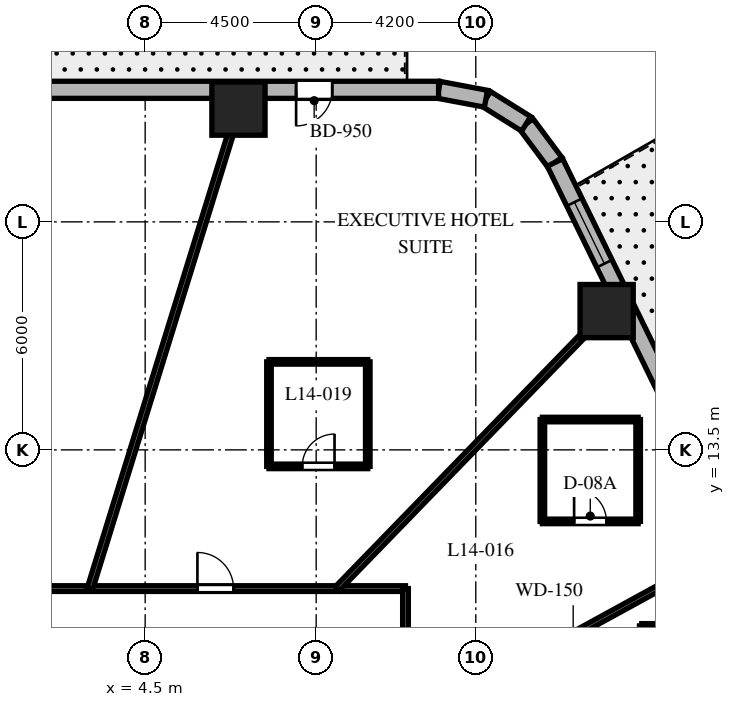
"""IFC4 building model, lengths in metres.
Left out: names, types, materials, properties, quantities, classifications, styles, units other than length and angle.
Written with IfcOpenShell. Run it as: python <this file> out.ifc"""

import sys

from ifc_helpers import new_model, si_unit, direction, frame, frame_2d, origin, origin_2d, place, context, subcontext, project, spatial, rectangle, extrude, element, fill, save


model = new_model("IFC4")
c1 = context("Model", 3, precision=1e-05, world=origin(), true_north=direction((0.0, 1.0)))
c2 = subcontext(c1, "Body", "Model", "MODEL_VIEW")
j1 = project(units=[si_unit("LENGTHUNIT", "METRE"), si_unit("PLANEANGLEUNIT", "RADIAN")], contexts=[c1])
p1 = place(None, origin())
s1 = spatial("IfcSite", under=j1, at=p1, CompositionType="ELEMENT")
p2 = place(p1, origin())
s2 = spatial("IfcBuilding", under=s1, at=p2, CompositionType="ELEMENT")
p3 = place(p2, frame((0.0, 0.0, 63.8)))
s3 = spatial("IfcBuildingStorey", under=s2, at=p3, CompositionType="ELEMENT", Elevation=63.8)
for number, where, z_axis, x_axis in (
    (1, (16.643, 17.152, 0.0), (0.0, 0.0, 1.0), (1.0, 0.0, 0.0)),
    (2, (6.955, 22.48, 0.0), (0.0, 0.0, 1.0), (1.0, 0.0, 0.0)),
):
    element("IfcColumn", number, at=place(p3, frame(where, z_axis=z_axis, x_axis=x_axis)), inside=s3, PredefinedType="COLUMN", context=c2, shape_type="SweptSolid", body=[
        extrude(rectangle(XDim=1.4, YDim=1.4, at=origin_2d()), origin(), (0.0, 0.0, 1.0), 3.7),
    ])
p4 = place(p3, frame((15.284, 21.062, 0.0), z_axis=(0.0, 0.0, 1.0), x_axis=(-0.597595366449, 0.801797841104, 0.0)))
e3 = element("IfcWall", 3, at=p4, inside=s3, PredefinedType="SOLIDWALL", context=c2, shape_type="SweptSolid", body=[
    extrude(rectangle(XDim=1.269, YDim=0.45, at=frame_2d((0.634, 0.0))), origin(), (0.0, 0.0, 1.0), 3.4),
])
p5 = place(p3, frame((14.526, 22.08, 0.0), z_axis=(0.0, 0.0, 1.0), x_axis=(-0.848185203596, 0.529699783275, 0.0)))
e4 = element("IfcWall", 4, at=p5, inside=s3, PredefinedType="SOLIDWALL", context=c2, shape_type="SweptSolid", body=[
    extrude(rectangle(XDim=1.247, YDim=0.45, at=frame_2d((0.624, 0.0))), origin(), (0.0, 0.0, 1.0), 3.4),
])
p6 = place(p3, frame((13.468, 22.74, 0.0), z_axis=(0.0, 0.0, 1.0), x_axis=(-0.982717174228, 0.185113358451, 0.0)))
e5 = element("IfcWall", 5, at=p6, inside=s3, PredefinedType="SOLIDWALL", context=c2, shape_type="SweptSolid", body=[
    extrude(rectangle(XDim=1.269, YDim=0.45, at=frame_2d((0.634, 0.0))), origin(), (0.0, 0.0, 1.0), 3.4),
])
p7 = place(p3, frame((24.336, 2.532, 0.0), z_axis=(0.0, 0.0, 1.0), x_axis=(-0.438931326393, 0.898520612291, 0.0)))
e6 = element("IfcWall", 6, at=p7, inside=s3, PredefinedType="SOLIDWALL", context=c2, shape_type="SweptSolid", body=[
    extrude(rectangle(XDim=20.623, YDim=0.45, at=frame_2d((10.312, 0.0))), origin(), (0.0, 0.0, 1.0), 3.4),
])
p8 = place(p7, frame((5.171, 0.0, 0.0)))
e7 = element("IfcOpeningElement", 7, at=p8, cuts=e6, PredefinedType="OPENING", context=c2, shape_type="SweptSolid", body=[
    extrude(rectangle(XDim=1.0, YDim=2.15, at=frame_2d((0.5, 1.075))), frame((0.0, 0.235, 0.0), z_axis=(0.0, -1.0, 0.0), x_axis=(1.0, 0.0, 0.0)), (0.0, 0.0, 1.0), 0.47),
])
p9 = place(p7, frame((6.8, 0.0, 0.8)))
e8 = element("IfcOpeningElement", 8, at=p9, cuts=e6, PredefinedType="OPENING", context=c2, shape_type="SweptSolid", body=[
    extrude(rectangle(XDim=1.8, YDim=1.8, at=frame_2d((0.9, 0.9))), frame((0.0, 0.235, 0.0), z_axis=(0.0, -1.0, 0.0), x_axis=(1.0, 0.0, 0.0)), (0.0, 0.0, 1.0), 0.47),
])
p10 = place(p7, frame((11.942, 0.0, 0.8)))
e9 = element("IfcOpeningElement", 9, at=p10, cuts=e6, PredefinedType="OPENING", context=c2, shape_type="SweptSolid", body=[
    extrude(rectangle(XDim=1.8, YDim=1.8, at=frame_2d((0.9, 0.9))), frame((0.0, 0.235, 0.0), z_axis=(0.0, -1.0, 0.0), x_axis=(1.0, 0.0, 0.0)), (0.0, 0.0, 1.0), 0.47),
])
p11 = place(p7, frame((17.66, 0.0, 0.8)))
e10 = element("IfcOpeningElement", 10, at=p11, cuts=e6, PredefinedType="OPENING", context=c2, shape_type="SweptSolid", body=[
    extrude(rectangle(XDim=1.8, YDim=1.8, at=frame_2d((0.9, 0.9))), frame((0.0, 0.235, 0.0), z_axis=(0.0, -1.0, 0.0), x_axis=(1.0, 0.0, 0.0)), (0.0, 0.0, 1.0), 0.47),
])
p12 = place(p7, frame((1.214, 0.0, 0.8)))
e11 = element("IfcOpeningElement", 11, at=p12, cuts=e6, PredefinedType="OPENING", context=c2, shape_type="SweptSolid", body=[
    extrude(rectangle(XDim=1.8, YDim=1.8, at=frame_2d((0.9, 0.9))), frame((0.0, 0.235, 0.0), z_axis=(0.0, -1.0, 0.0), x_axis=(1.0, 0.0, 0.0)), (0.0, 0.0, 1.0), 0.47),
])
p13 = place(p3, frame((12.221, 22.975, 0.0), z_axis=(0.0, 0.0, 1.0), x_axis=(-1.0, 0.0, 0.0)))
e12 = element("IfcWall", 12, at=p13, inside=s3, PredefinedType="SOLIDWALL", context=c2, shape_type="SweptSolid", body=[
    extrude(rectangle(XDim=26.389, YDim=0.45, at=frame_2d((13.195, 0.0))), origin(), (0.0, 0.0, 1.0), 3.4),
])
p14 = place(p13, frame((2.799, 0.0, 0.0)))
e13 = element("IfcOpeningElement", 13, at=p14, cuts=e12, PredefinedType="OPENING", context=c2, shape_type="SweptSolid", body=[
    extrude(rectangle(XDim=0.95, YDim=2.15, at=frame_2d((0.475, 1.075))), frame((0.0, 0.235, 0.0), z_axis=(0.0, -1.0, 0.0), x_axis=(1.0, 0.0, 0.0)), (0.0, 0.0, 1.0), 0.47),
])
p15 = place(p13, frame((12.296, 0.0, 0.8)))
e14 = element("IfcOpeningElement", 14, at=p15, cuts=e12, PredefinedType="OPENING", context=c2, shape_type="SweptSolid", body=[
    extrude(rectangle(XDim=1.8, YDim=1.8, at=frame_2d((0.9, 0.9))), frame((0.0, 0.235, 0.0), z_axis=(0.0, -1.0, 0.0), x_axis=(1.0, 0.0, 0.0)), (0.0, 0.0, 1.0), 0.47),
])
p16 = place(p13, frame((22.938, 0.0, 0.8)))
e15 = element("IfcOpeningElement", 15, at=p16, cuts=e12, PredefinedType="OPENING", context=c2, shape_type="SweptSolid", body=[
    extrude(rectangle(XDim=1.8, YDim=1.8, at=frame_2d((0.9, 0.9))), frame((0.0, 0.235, 0.0), z_axis=(0.0, -1.0, 0.0), x_axis=(1.0, 0.0, 0.0)), (0.0, 0.0, 1.0), 0.47),
])
p17 = place(p3, frame((-11.35, 9.85, 0.0), z_axis=(0.0, 0.0, 1.0), x_axis=(1.0, 0.0, 0.0)))
e16 = element("IfcWall", 16, at=p17, inside=s3, PredefinedType="PARTITIONING", context=c2, shape_type="SweptSolid", body=[
    extrude(rectangle(XDim=22.7, YDim=0.15, at=frame_2d((11.35, 0.0))), origin(), (0.0, 0.0, 1.0), 2.84),
])
p18 = place(p17, frame((17.225, 0.0, 0.0)))
e17 = element("IfcOpeningElement", 17, at=p18, cuts=e16, PredefinedType="OPENING", context=c2, shape_type="SweptSolid", body=[
    extrude(rectangle(XDim=0.95, YDim=2.03, at=frame_2d((0.475, 1.015))), frame((0.0, 0.085, 0.0), z_axis=(0.0, -1.0, 0.0), x_axis=(1.0, 0.0, 0.0)), (0.0, 0.0, 1.0), 0.17),
])
p19 = place(p17, frame((10.444, 0.0, 0.0)))
e18 = element("IfcOpeningElement", 18, at=p19, cuts=e16, PredefinedType="OPENING", context=c2, shape_type="SweptSolid", body=[
    extrude(rectangle(XDim=0.95, YDim=2.03, at=frame_2d((0.475, 1.015))), frame((0.0, 0.085, 0.0), z_axis=(0.0, -1.0, 0.0), x_axis=(1.0, 0.0, 0.0)), (0.0, 0.0, 1.0), 0.17),
])
p20 = place(p17, frame((3.369, 0.0, 0.0)))
e19 = element("IfcOpeningElement", 19, at=p20, cuts=e16, PredefinedType="OPENING", context=c2, shape_type="SweptSolid", body=[
    extrude(rectangle(XDim=0.95, YDim=2.03, at=frame_2d((0.475, 1.015))), frame((0.0, 0.085, 0.0), z_axis=(0.0, -1.0, 0.0), x_axis=(1.0, 0.0, 0.0)), (0.0, 0.0, 1.0), 0.17),
])
p21 = place(p3, frame((11.35, 9.85, 0.0), z_axis=(0.0, 0.0, 1.0), x_axis=(0.0, -1.0, 0.0)))
e20 = element("IfcWall", 20, at=p21, inside=s3, PredefinedType="PARTITIONING", context=c2, shape_type="SweptSolid", body=[
    extrude(rectangle(XDim=19.7, YDim=0.15, at=frame_2d((9.85, 0.0))), origin(), (0.0, 0.0, 1.0), 2.84),
])
p22 = place(p21, frame((4.704, 0.0, 0.0)))
e21 = element("IfcOpeningElement", 21, at=p22, cuts=e20, PredefinedType="OPENING", context=c2, shape_type="SweptSolid", body=[
    extrude(rectangle(XDim=0.95, YDim=2.03, at=frame_2d((0.475, 1.015))), frame((0.0, 0.085, 0.0), z_axis=(0.0, -1.0, 0.0), x_axis=(1.0, 0.0, 0.0)), (0.0, 0.0, 1.0), 0.17),
])
p23 = place(p21, frame((1.462, 0.0, 0.0)))
e22 = element("IfcOpeningElement", 22, at=p23, cuts=e20, PredefinedType="OPENING", context=c2, shape_type="SweptSolid", body=[
    extrude(rectangle(XDim=0.95, YDim=2.03, at=frame_2d((0.475, 1.015))), frame((0.0, 0.085, 0.0), z_axis=(0.0, -1.0, 0.0), x_axis=(1.0, 0.0, 0.0)), (0.0, 0.0, 1.0), 0.17),
])
p24 = place(p21, frame((15.191, 0.0, 0.0)))
e23 = element("IfcOpeningElement", 23, at=p24, cuts=e20, PredefinedType="OPENING", context=c2, shape_type="SweptSolid", body=[
    extrude(rectangle(XDim=0.95, YDim=2.03, at=frame_2d((0.475, 1.015))), frame((0.0, 0.085, 0.0), z_axis=(0.0, -1.0, 0.0), x_axis=(1.0, 0.0, 0.0)), (0.0, 0.0, 1.0), 0.17),
])
p25 = place(p21, frame((8.838, 0.0, 0.0)))
e24 = element("IfcOpeningElement", 24, at=p25, cuts=e20, PredefinedType="OPENING", context=c2, shape_type="SweptSolid", body=[
    extrude(rectangle(XDim=0.95, YDim=2.03, at=frame_2d((0.475, 1.015))), frame((0.0, 0.085, 0.0), z_axis=(0.0, -1.0, 0.0), x_axis=(1.0, 0.0, 0.0)), (0.0, 0.0, 1.0), 0.17),
])
p26 = place(p3, frame((11.35, 6.217, 0.0), z_axis=(0.0, 0.0, 1.0), x_axis=(0.877047587135, 0.480403507378, 0.0)))
e25 = element("IfcWall", 25, at=p26, inside=s3, PredefinedType="PARTITIONING", context=c2, shape_type="SweptSolid", body=[
    extrude(rectangle(XDim=10.062, YDim=0.15, at=frame_2d((5.031, 0.0))), origin(), (0.0, 0.0, 1.0), 2.54),
])
p27 = place(p3, frame((9.558, 9.85, 0.0), z_axis=(0.0, 0.0, 1.0), x_axis=(0.69638346089, 0.717669893056, 0.0)))
e26 = element("IfcWall", 26, at=p27, inside=s3, PredefinedType="PARTITIONING", context=c2, shape_type="SweptSolid", body=[
    extrude(rectangle(XDim=10.701, YDim=0.15, at=frame_2d((5.351, 0.0))), origin(), (0.0, 0.0, 1.0), 2.54),
])
p28 = place(p3, frame((3.048, 9.85, 0.0), z_axis=(0.0, 0.0, 1.0), x_axis=(0.295553992761, 0.955326037206, 0.0)))
e27 = element("IfcWall", 27, at=p28, inside=s3, PredefinedType="PARTITIONING", context=c2, shape_type="SweptSolid", body=[
    extrude(rectangle(XDim=13.739, YDim=0.15, at=frame_2d((6.869, 0.0))), origin(), (0.0, 0.0, 1.0), 2.54),
])
p29 = place(p3, frame((20.007, 8.868, 0.0), z_axis=(0.0, 0.0, 1.0), x_axis=(-1.0, 0.0, 0.0)))
e28 = element("IfcWall", 28, at=p29, inside=s3, PredefinedType="PARTITIONING", context=c2, shape_type="SweptSolid", body=[
    extrude(rectangle(XDim=2.44, YDim=0.12, at=frame_2d((1.22, 0.0))), origin(), (0.0, 0.0, 1.0), 3.4),
])
p30 = place(p3, frame((17.567, 8.868, 0.0), z_axis=(0.0, 0.0, 1.0), x_axis=(0.0, -1.0, 0.0)))
e29 = element("IfcWall", 29, at=p30, inside=s3, PredefinedType="PARTITIONING", context=c2, shape_type="SweptSolid", body=[
    extrude(rectangle(XDim=2.61, YDim=0.12, at=frame_2d((1.305, 0.0))), origin(), (0.0, 0.0, 1.0), 2.84),
])
p31 = place(p3, frame((14.952, 11.618, 0.0), z_axis=(0.0, 0.0, 1.0), x_axis=(1.0, 0.0, 0.0)))
e30 = element("IfcWall", 30, at=p31, inside=s3, PredefinedType="PARTITIONING", context=c2, shape_type="SweptSolid", body=[
    extrude(rectangle(XDim=2.52, YDim=0.12, at=frame_2d((1.26, 0.0))), origin(), (0.0, 0.0, 1.0), 2.927),
])
p32 = place(p31, frame((0.835, 0.0, 0.0)))
e31 = element("IfcOpeningElement", 31, at=p32, cuts=e30, PredefinedType="OPENING", context=c2, shape_type="SweptSolid", body=[
    extrude(rectangle(XDim=0.85, YDim=2.03, at=frame_2d((0.425, 1.015))), frame((0.0, 0.07, 0.0), z_axis=(0.0, -1.0, 0.0), x_axis=(1.0, 0.0, 0.0)), (0.0, 0.0, 1.0), 0.14),
])
p33 = place(p3, frame((17.472, 11.618, 0.0), z_axis=(0.0, 0.0, 1.0), x_axis=(0.0, 1.0, 0.0)))
e32 = element("IfcWall", 32, at=p33, inside=s3, PredefinedType="PARTITIONING", context=c2, shape_type="SweptSolid", body=[
    extrude(rectangle(XDim=2.68, YDim=0.12, at=frame_2d((1.34, 0.0))), origin(), (0.0, 0.0, 1.0), 3.4),
])
p34 = place(p3, frame((17.472, 14.298, 0.0), z_axis=(0.0, 0.0, 1.0), x_axis=(-1.0, 0.0, 0.0)))
e33 = element("IfcWall", 33, at=p34, inside=s3, PredefinedType="PARTITIONING", context=c2, shape_type="SweptSolid", body=[
    extrude(rectangle(XDim=2.52, YDim=0.12, at=frame_2d((1.26, 0.0))), origin(), (0.0, 0.0, 1.0), 3.4),
])
p35 = place(p3, frame((14.952, 14.298, 0.0), z_axis=(0.0, 0.0, 1.0), x_axis=(0.0, -1.0, 0.0)))
e34 = element("IfcWall", 34, at=p35, inside=s3, PredefinedType="PARTITIONING", context=c2, shape_type="SweptSolid", body=[
    extrude(rectangle(XDim=2.68, YDim=0.12, at=frame_2d((1.34, 0.0))), origin(), (0.0, 0.0, 1.0), 2.927),
])
p36 = place(p3, frame((7.758, 13.066, 0.0), z_axis=(0.0, 0.0, 1.0), x_axis=(1.0, 0.0, 0.0)))
e35 = element("IfcWall", 35, at=p36, inside=s3, PredefinedType="PARTITIONING", context=c2, shape_type="SweptSolid", body=[
    extrude(rectangle(XDim=2.6, YDim=0.12, at=frame_2d((1.3, 0.0))), origin(), (0.0, 0.0, 1.0), 2.84),
])
p37 = place(p36, frame((0.875, 0.0, 0.0)))
e36 = element("IfcOpeningElement", 36, at=p37, cuts=e35, PredefinedType="OPENING", context=c2, shape_type="SweptSolid", body=[
    extrude(rectangle(XDim=0.85, YDim=2.03, at=frame_2d((0.425, 1.015))), frame((0.0, 0.07, 0.0), z_axis=(0.0, -1.0, 0.0), x_axis=(1.0, 0.0, 0.0)), (0.0, 0.0, 1.0), 0.14),
])
p38 = place(p3, frame((10.358, 13.066, 0.0), z_axis=(0.0, 0.0, 1.0), x_axis=(0.0, 1.0, 0.0)))
e37 = element("IfcWall", 37, at=p38, inside=s3, PredefinedType="PARTITIONING", context=c2, shape_type="SweptSolid", body=[
    extrude(rectangle(XDim=2.75, YDim=0.12, at=frame_2d((1.375, 0.0))), origin(), (0.0, 0.0, 1.0), 3.4),
])
p39 = place(p3, frame((10.358, 15.816, 0.0), z_axis=(0.0, 0.0, 1.0), x_axis=(-1.0, 0.0, 0.0)))
e38 = element("IfcWall", 38, at=p39, inside=s3, PredefinedType="PARTITIONING", context=c2, shape_type="SweptSolid", body=[
    extrude(rectangle(XDim=2.6, YDim=0.12, at=frame_2d((1.3, 0.0))), origin(), (0.0, 0.0, 1.0), 2.84),
])
p40 = place(p3, frame((7.758, 15.816, 0.0), z_axis=(0.0, 0.0, 1.0), x_axis=(0.0, -1.0, 0.0)))
e39 = element("IfcWall", 39, at=p40, inside=s3, PredefinedType="PARTITIONING", context=c2, shape_type="SweptSolid", body=[
    extrude(rectangle(XDim=2.75, YDim=0.12, at=frame_2d((1.375, 0.0))), origin(), (0.0, 0.0, 1.0), 2.84),
])
p41 = place(p11, origin())
e40 = element("IfcWindow", 40, at=p41, inside=s3, PartitioningType="SINGLE_PANEL", PredefinedType="WINDOW", context=c2, shape_type="SweptSolid", body=[
    extrude(rectangle(XDim=1.8, YDim=1.8, at=frame_2d((0.9, 0.9))), frame((0.0, 0.03, 0.0), z_axis=(0.0, -1.0, 0.0), x_axis=(1.0, 0.0, 0.0)), (0.0, 0.0, 1.0), 0.06),
])
fill(e10, e40)
p42 = place(p14, origin())
e41 = element("IfcDoor", 41, at=p42, inside=s3, OperationType="SINGLE_SWING_RIGHT", PredefinedType="DOOR", context=c2, shape_type="SweptSolid", body=[
    extrude(rectangle(XDim=0.95, YDim=2.15, at=frame_2d((0.475, 1.075))), frame((0.0, 0.025, 0.0), z_axis=(0.0, -1.0, 0.0), x_axis=(1.0, 0.0, 0.0)), (0.0, 0.0, 1.0), 0.05),
])
fill(e13, e41)
p43 = place(p32, origin())
e42 = element("IfcDoor", 42, at=p43, inside=s3, OperationType="SINGLE_SWING_LEFT", PredefinedType="DOOR", context=c2, shape_type="SweptSolid", body=[
    extrude(rectangle(XDim=0.85, YDim=2.03, at=frame_2d((0.425, 1.015))), frame((0.0, 0.025, 0.0), z_axis=(0.0, -1.0, 0.0), x_axis=(1.0, 0.0, 0.0)), (0.0, 0.0, 1.0), 0.05),
])
fill(e31, e42)
p44 = place(p18, origin())
e43 = element("IfcDoor", 43, at=p44, inside=s3, OperationType="SINGLE_SWING_LEFT", PredefinedType="DOOR", context=c2, shape_type="SweptSolid", body=[
    extrude(rectangle(XDim=0.95, YDim=2.03, at=frame_2d((0.475, 1.015))), frame((0.0, 0.025, 0.0), z_axis=(0.0, -1.0, 0.0), x_axis=(1.0, 0.0, 0.0)), (0.0, 0.0, 1.0), 0.05),
])
fill(e17, e43)
p45 = place(p37, origin())
e44 = element("IfcDoor", 44, at=p45, inside=s3, OperationType="SINGLE_SWING_RIGHT", PredefinedType="DOOR", context=c2, shape_type="SweptSolid", body=[
    extrude(rectangle(XDim=0.85, YDim=2.03, at=frame_2d((0.425, 1.015))), frame((0.0, 0.025, 0.0), z_axis=(0.0, -1.0, 0.0), x_axis=(1.0, 0.0, 0.0)), (0.0, 0.0, 1.0), 0.05),
])
fill(e36, e44)
save(model, sys.argv[1])
